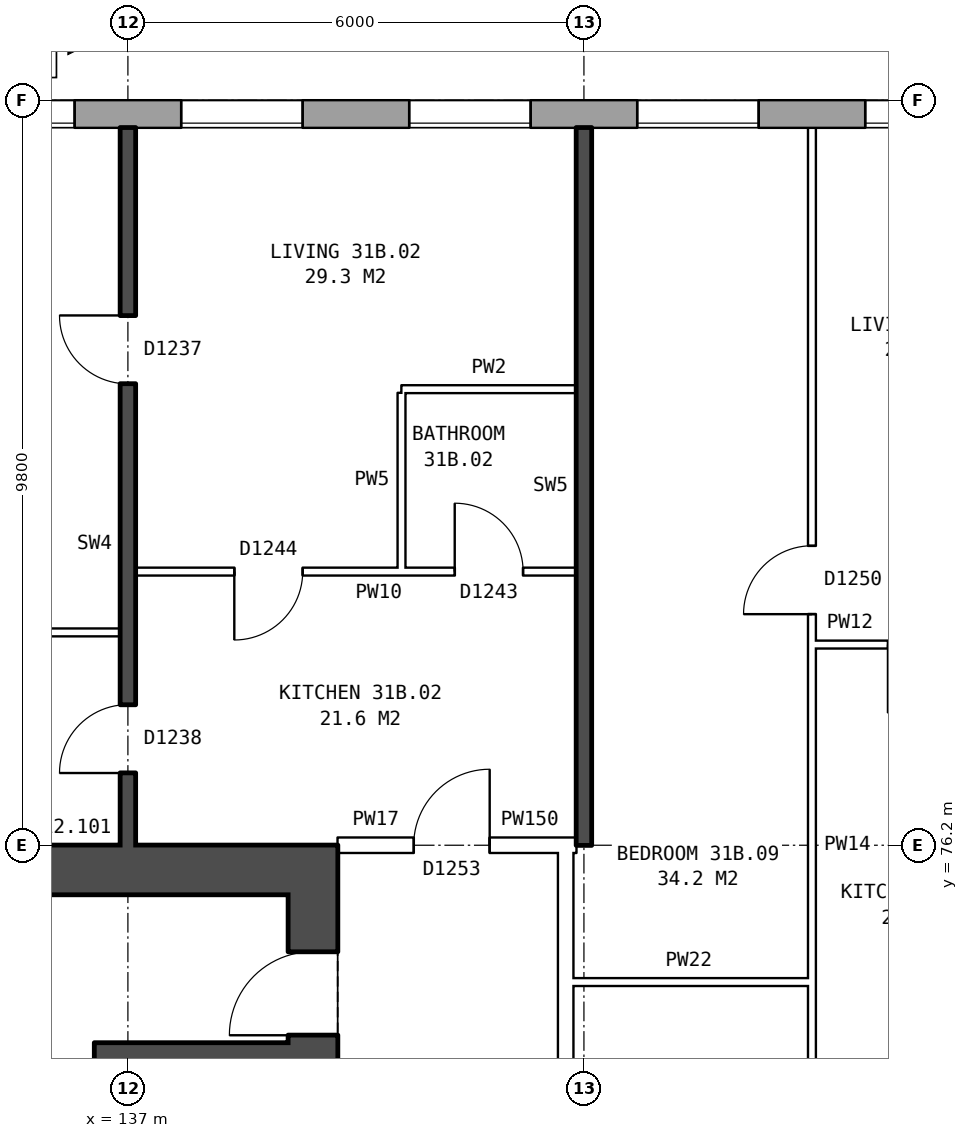
"""IFC4 building model, lengths in metres.
Left out: names, types, materials, properties, quantities, classifications, styles, units other than length and angle.
Written with IfcOpenShell. Run it as: python <this file> out.ifc"""

import sys

from ifc_helpers import new_model, si_unit, direction, frame, frame_2d, origin, place, context, subcontext, project, spatial, rectangle, extrude, element, fill, save


model = new_model("IFC4")
c1 = context("Model", 3, precision=1e-05, world=origin(), true_north=direction((0.0, 1.0)))
c2 = subcontext(c1, "Body", "Model", "MODEL_VIEW")
j1 = project(units=[si_unit("LENGTHUNIT", "METRE"), si_unit("PLANEANGLEUNIT", "RADIAN")], contexts=[c1])
p1 = place(None, origin())
s1 = spatial("IfcSite", under=j1, at=p1, CompositionType="ELEMENT")
p2 = place(p1, origin())
s2 = spatial("IfcBuilding", under=s1, at=p2, CompositionType="ELEMENT")
p3 = place(p2, frame((0.0, 0.0, 111.9)))
s3 = spatial("IfcBuildingStorey", under=s2, at=p3, CompositionType="ELEMENT", Elevation=111.9)
p4 = place(p3, frame((170.925, 85.82, 0.0), z_axis=(0.0, 0.0, 1.0), x_axis=(-1.0, 0.0, 0.0)))
e1 = element("IfcWall", 1, at=p4, inside=s3, PredefinedType="STANDARD", context=c2, shape_type="SweptSolid", body=[
    extrude(rectangle(XDim=36.851, YDim=0.36, at=frame_2d((18.425, 0.0))), origin(), (0.0, 0.0, 1.0), 2.85),
])
p5 = place(p4, frame((1.625, 0.0, 0.8)))
e2 = element("IfcOpeningElement", 2, at=p5, cuts=e1, PredefinedType="OPENING", context=c2, shape_type="SweptSolid", body=[
    extrude(rectangle(XDim=1.6, YDim=1.8, at=frame_2d((0.8, 0.9))), frame((0.0, 0.19, 0.0), z_axis=(0.0, -1.0, 0.0), x_axis=(1.0, 0.0, 0.0)), (0.0, 0.0, 1.0), 0.38),
])
p6 = place(p4, frame((4.625, 0.0, 0.8)))
e3 = element("IfcOpeningElement", 3, at=p6, cuts=e1, PredefinedType="OPENING", context=c2, shape_type="SweptSolid", body=[
    extrude(rectangle(XDim=1.6, YDim=1.8, at=frame_2d((0.8, 0.9))), frame((0.0, 0.19, 0.0), z_axis=(0.0, -1.0, 0.0), x_axis=(1.0, 0.0, 0.0)), (0.0, 0.0, 1.0), 0.38),
])
p7 = place(p4, frame((7.625, 0.0, 0.8)))
e4 = element("IfcOpeningElement", 4, at=p7, cuts=e1, PredefinedType="OPENING", context=c2, shape_type="SweptSolid", body=[
    extrude(rectangle(XDim=1.6, YDim=1.8, at=frame_2d((0.8, 0.9))), frame((0.0, 0.19, 0.0), z_axis=(0.0, -1.0, 0.0), x_axis=(1.0, 0.0, 0.0)), (0.0, 0.0, 1.0), 0.38),
])
p8 = place(p4, frame((10.625, 0.0, 0.8)))
e5 = element("IfcOpeningElement", 5, at=p8, cuts=e1, PredefinedType="OPENING", context=c2, shape_type="SweptSolid", body=[
    extrude(rectangle(XDim=1.6, YDim=1.8, at=frame_2d((0.8, 0.9))), frame((0.0, 0.19, 0.0), z_axis=(0.0, -1.0, 0.0), x_axis=(1.0, 0.0, 0.0)), (0.0, 0.0, 1.0), 0.38),
])
p9 = place(p4, frame((13.625, 0.0, 0.8)))
e6 = element("IfcOpeningElement", 6, at=p9, cuts=e1, PredefinedType="OPENING", context=c2, shape_type="SweptSolid", body=[
    extrude(rectangle(XDim=1.6, YDim=1.8, at=frame_2d((0.8, 0.9))), frame((0.0, 0.19, 0.0), z_axis=(0.0, -1.0, 0.0), x_axis=(1.0, 0.0, 0.0)), (0.0, 0.0, 1.0), 0.38),
])
p10 = place(p4, frame((17.075, 0.0, 0.15)))
e7 = element("IfcOpeningElement", 7, at=p10, cuts=e1, PredefinedType="OPENING", context=c2, shape_type="SweptSolid", body=[
    extrude(rectangle(XDim=0.6, YDim=0.9, at=frame_2d((0.3, 0.45))), frame((0.0, 0.19, 0.0), z_axis=(0.0, -1.0, 0.0), x_axis=(1.0, 0.0, 0.0)), (0.0, 0.0, 1.0), 0.38),
])
p11 = place(p4, frame((19.075, 0.0, 0.25)))
e8 = element("IfcOpeningElement", 8, at=p11, cuts=e1, PredefinedType="OPENING", context=c2, shape_type="SweptSolid", body=[
    extrude(rectangle(XDim=0.6, YDim=0.9, at=frame_2d((0.3, 0.45))), frame((0.0, 0.19, 0.0), z_axis=(0.0, -1.0, 0.0), x_axis=(1.0, 0.0, 0.0)), (0.0, 0.0, 1.0), 0.38),
])
p12 = place(p4, frame((22.625, 0.0, 0.8)))
e9 = element("IfcOpeningElement", 9, at=p12, cuts=e1, PredefinedType="OPENING", context=c2, shape_type="SweptSolid", body=[
    extrude(rectangle(XDim=1.6, YDim=1.8, at=frame_2d((0.8, 0.9))), frame((0.0, 0.19, 0.0), z_axis=(0.0, -1.0, 0.0), x_axis=(1.0, 0.0, 0.0)), (0.0, 0.0, 1.0), 0.38),
])
p13 = place(p4, frame((25.625, 0.0, 0.8)))
e10 = element("IfcOpeningElement", 10, at=p13, cuts=e1, PredefinedType="OPENING", context=c2, shape_type="SweptSolid", body=[
    extrude(rectangle(XDim=1.6, YDim=1.8, at=frame_2d((0.8, 0.9))), frame((0.0, 0.19, 0.0), z_axis=(0.0, -1.0, 0.0), x_axis=(1.0, 0.0, 0.0)), (0.0, 0.0, 1.0), 0.38),
])
p14 = place(p4, frame((28.625, 0.0, 0.8)))
e11 = element("IfcOpeningElement", 11, at=p14, cuts=e1, PredefinedType="OPENING", context=c2, shape_type="SweptSolid", body=[
    extrude(rectangle(XDim=1.6, YDim=1.8, at=frame_2d((0.8, 0.9))), frame((0.0, 0.19, 0.0), z_axis=(0.0, -1.0, 0.0), x_axis=(1.0, 0.0, 0.0)), (0.0, 0.0, 1.0), 0.38),
])
p15 = place(p4, frame((31.625, 0.0, 0.8)))
e12 = element("IfcOpeningElement", 12, at=p15, cuts=e1, PredefinedType="OPENING", context=c2, shape_type="SweptSolid", body=[
    extrude(rectangle(XDim=1.6, YDim=1.8, at=frame_2d((0.8, 0.9))), frame((0.0, 0.19, 0.0), z_axis=(0.0, -1.0, 0.0), x_axis=(1.0, 0.0, 0.0)), (0.0, 0.0, 1.0), 0.38),
])
p16 = place(p4, frame((34.625, 0.0, 0.8)))
e13 = element("IfcOpeningElement", 13, at=p16, cuts=e1, PredefinedType="OPENING", context=c2, shape_type="SweptSolid", body=[
    extrude(rectangle(XDim=1.6, YDim=1.8, at=frame_2d((0.8, 0.9))), frame((0.0, 0.19, 0.0), z_axis=(0.0, -1.0, 0.0), x_axis=(1.0, 0.0, 0.0)), (0.0, 0.0, 1.0), 0.38),
])
p17 = place(p4, frame((17.975, 0.0, 0.25)))
e14 = element("IfcOpeningElement", 14, at=p17, cuts=e1, PredefinedType="OPENING", context=c2, shape_type="SweptSolid", body=[
    extrude(rectangle(XDim=0.8, YDim=1.5, at=frame_2d((0.4, 0.75))), frame((0.0, 0.19, 0.0), z_axis=(0.0, -1.0, 0.0), x_axis=(1.0, 0.0, 0.0)), (0.0, 0.0, 1.0), 0.38),
])
p18 = place(p4, frame((20.525, 0.0, 1.35)))
e15 = element("IfcOpeningElement", 15, at=p18, cuts=e1, PredefinedType="OPENING", context=c2, shape_type="SweptSolid", body=[
    extrude(rectangle(XDim=1.2, YDim=1.2, at=frame_2d((0.6, 0.6))), frame((0.0, 0.19, 0.0), z_axis=(0.0, -1.0, 0.0), x_axis=(1.0, 0.0, 0.0)), (0.0, 0.0, 1.0), 0.38),
])
p19 = place(p3, frame((139.435, 64.45, 0.0), z_axis=(0.0, 0.0, 1.0), x_axis=(0.0, 1.0, 0.0)))
e16 = element("IfcWall", 16, at=p19, inside=s3, PredefinedType="SHEAR", context=c2, shape_type="SweptSolid", body=[
    extrude(rectangle(XDim=11.1, YDim=0.65, at=frame_2d((5.55, 0.0))), origin(), (0.0, 0.0, 1.0), 2.85),
])
p20 = place(p19, frame((0.675, 0.0, 0.0)))
e17 = element("IfcOpeningElement", 17, at=p20, cuts=e16, PredefinedType="OPENING", context=c2, shape_type="SweptSolid", body=[
    extrude(rectangle(XDim=1.1, YDim=2.1, at=frame_2d((0.55, 1.05))), frame((0.0, 0.335, 0.0), z_axis=(0.0, -1.0, 0.0), x_axis=(1.0, 0.0, 0.0)), (0.0, 0.0, 1.0), 0.67),
])
p21 = place(p19, frame((9.25, 0.0, 0.0)))
e18 = element("IfcOpeningElement", 18, at=p21, cuts=e16, PredefinedType="OPENING", context=c2, shape_type="SweptSolid", body=[
    extrude(rectangle(XDim=1.1, YDim=2.1, at=frame_2d((0.55, 1.05))), frame((0.0, 0.335, 0.0), z_axis=(0.0, -1.0, 0.0), x_axis=(1.0, 0.0, 0.0)), (0.0, 0.0, 1.0), 0.67),
])
p22 = place(p19, frame((7.475, 0.0, 0.0)))
e19 = element("IfcOpeningElement", 19, at=p22, cuts=e16, PredefinedType="OPENING", context=c2, shape_type="SweptSolid", body=[
    extrude(rectangle(XDim=0.85, YDim=2.1, at=frame_2d((0.425, 1.05))), frame((0.0, 0.335, 0.0), z_axis=(0.0, -1.0, 0.0), x_axis=(1.0, 0.0, 0.0)), (0.0, 0.0, 1.0), 0.67),
])
p23 = place(p3, frame((139.76, 75.875, 0.0), z_axis=(0.0, 0.0, 1.0), x_axis=(-1.0, 0.0, 0.0)))
e20 = element("IfcWall", 20, at=p23, inside=s3, PredefinedType="SHEAR", context=c2, shape_type="SweptSolid", body=[
    extrude(rectangle(XDim=8.4, YDim=0.65, at=frame_2d((4.2, 0.0))), origin(), (0.0, 0.0, 1.0), 2.85),
])
p24 = place(p3, frame((139.11, 73.45, 0.0), z_axis=(0.0, 0.0, 1.0), x_axis=(-1.0, 0.0, 0.0)))
e21 = element("IfcWall", 21, at=p24, inside=s3, PredefinedType="SHEAR", context=c2, shape_type="SweptSolid", body=[
    extrude(rectangle(XDim=2.25, YDim=0.3, at=frame_2d((1.125, 0.0))), origin(), (0.0, 0.0, 1.0), 2.85),
])
p25 = place(p3, frame((136.71, 71.4, 0.0), z_axis=(0.0, 0.0, 1.0), x_axis=(0.0, 1.0, 0.0)))
e22 = element("IfcWall", 22, at=p25, inside=s3, PredefinedType="SHEAR", context=c2, shape_type="SweptSolid", body=[
    extrude(rectangle(XDim=2.2, YDim=0.3, at=frame_2d((1.1, 0.0))), origin(), (0.0, 0.0, 1.0), 2.85),
])
p26 = place(p3, frame((142.76, 63.9, 0.0), z_axis=(0.0, 0.0, 1.0), x_axis=(0.0, 1.0, 0.0)))
e23 = element("IfcWall", 23, at=p26, inside=s3, PredefinedType="PARTITIONING", context=c2, shape_type="SweptSolid", body=[
    extrude(rectangle(XDim=12.2, YDim=0.2, at=frame_2d((6.1, 0.0))), origin(), (0.0, 0.0, 1.0), 2.85),
])
p27 = place(p26, frame((5.1, 0.0, 0.0)))
e24 = element("IfcOpeningElement", 24, at=p27, cuts=e23, PredefinedType="OPENING", context=c2, shape_type="SweptSolid", body=[
    extrude(rectangle(XDim=2.0, YDim=2.1, at=frame_2d((1.0, 1.05))), frame((0.0, 0.11, 0.0), z_axis=(0.0, -1.0, 0.0), x_axis=(1.0, 0.0, 0.0)), (0.0, 0.0, 1.0), 0.22),
])
p28 = place(p3, frame((142.76, 74.4, 0.0), z_axis=(0.0, 0.0, 1.0), x_axis=(1.0, 0.0, 0.0)))
e25 = element("IfcWall", 25, at=p28, inside=s3, PredefinedType="PARTITIONING", context=c2, shape_type="SweptSolid", body=[
    extrude(rectangle(XDim=3.24, YDim=0.1, at=frame_2d((1.62, 0.0))), origin(), (0.0, 0.0, 1.0), 2.85),
])
p29 = place(p3, frame((139.76, 76.2, 0.0), z_axis=(0.0, 0.0, 1.0), x_axis=(1.0, 0.0, 0.0)))
e26 = element("IfcWall", 26, at=p29, inside=s3, PredefinedType="PARTITIONING", context=c2, shape_type="SweptSolid", body=[
    extrude(rectangle(XDim=3.0, YDim=0.2, at=frame_2d((1.5, 0.0))), origin(), (0.0, 0.0, 1.0), 2.85),
])
p30 = place(p29, frame((1.0, 0.0, 0.0)))
e27 = element("IfcOpeningElement", 27, at=p30, cuts=e26, PredefinedType="OPENING", context=c2, shape_type="SweptSolid", body=[
    extrude(rectangle(XDim=1.0, YDim=2.1, at=frame_2d((0.5, 1.05))), frame((0.0, 0.11, 0.0), z_axis=(0.0, -1.0, 0.0), x_axis=(1.0, 0.0, 0.0)), (0.0, 0.0, 1.0), 0.22),
])
p31 = place(p3, frame((142.76, 76.2, 0.0), z_axis=(0.0, 0.0, 1.0), x_axis=(1.0, 0.0, 0.0)))
e28 = element("IfcWall", 28, at=p31, inside=s3, PredefinedType="PARTITIONING", context=c2, shape_type="SweptSolid", body=[
    extrude(rectangle(XDim=0.14, YDim=0.2, at=frame_2d((0.07, 0.0))), origin(), (0.0, 0.0, 1.0), 2.85),
])
p32 = place(p3, frame((146.0, 78.84, 0.0), z_axis=(0.0, 0.0, 1.0), x_axis=(1.0, 0.0, 0.0)))
e29 = element("IfcWall", 29, at=p32, inside=s3, PredefinedType="PARTITIONING", context=c2, shape_type="SweptSolid", body=[
    extrude(rectangle(XDim=2.9, YDim=0.1, at=frame_2d((1.45, 0.0))), origin(), (0.0, 0.0, 1.0), 2.85),
])
p33 = place(p32, frame((1.0, 0.0, 0.0)))
e30 = element("IfcOpeningElement", 30, at=p33, cuts=e29, PredefinedType="OPENING", context=c2, shape_type="SweptSolid", body=[
    extrude(rectangle(XDim=0.9, YDim=2.1, at=frame_2d((0.45, 1.05))), frame((0.0, 0.06, 0.0), z_axis=(0.0, -1.0, 0.0), x_axis=(1.0, 0.0, 0.0)), (0.0, 0.0, 1.0), 0.12),
])
p34 = place(p3, frame((131.36, 79.0, 0.0), z_axis=(0.0, 0.0, 1.0), x_axis=(1.0, 0.0, 0.0)))
e31 = element("IfcWall", 31, at=p34, inside=s3, PredefinedType="PARTITIONING", context=c2, shape_type="SweptSolid", body=[
    extrude(rectangle(XDim=5.54, YDim=0.1, at=frame_2d((2.77, 0.0))), origin(), (0.0, 0.0, 1.0), 2.85),
])
p35 = place(p3, frame((137.1, 79.8, 0.0), z_axis=(0.0, 0.0, 1.0), x_axis=(1.0, 0.0, 0.0)))
e32 = element("IfcWall", 32, at=p35, inside=s3, PredefinedType="PARTITIONING", context=c2, shape_type="SweptSolid", body=[
    extrude(rectangle(XDim=5.8, YDim=0.1, at=frame_2d((2.9, 0.0))), origin(), (0.0, 0.0, 1.0), 2.85),
])
p36 = place(p35, frame((1.3, 0.0, 0.0)))
e33 = element("IfcOpeningElement", 33, at=p36, cuts=e32, PredefinedType="OPENING", context=c2, shape_type="SweptSolid", body=[
    extrude(rectangle(XDim=0.9, YDim=2.1, at=frame_2d((0.45, 1.05))), frame((0.0, 0.06, 0.0), z_axis=(0.0, -1.0, 0.0), x_axis=(1.0, 0.0, 0.0)), (0.0, 0.0, 1.0), 0.12),
])
p37 = place(p35, frame((4.2, 0.0, 0.0)))
e34 = element("IfcOpeningElement", 34, at=p37, cuts=e32, PredefinedType="OPENING", context=c2, shape_type="SweptSolid", body=[
    extrude(rectangle(XDim=0.9, YDim=2.1, at=frame_2d((0.45, 1.05))), frame((0.0, 0.06, 0.0), z_axis=(0.0, -1.0, 0.0), x_axis=(1.0, 0.0, 0.0)), (0.0, 0.0, 1.0), 0.12),
])
p38 = place(p3, frame((140.6, 82.2, 0.0), z_axis=(0.0, 0.0, 1.0), x_axis=(1.0, 0.0, 0.0)))
e35 = element("IfcWall", 35, at=p38, inside=s3, PredefinedType="PARTITIONING", context=c2, shape_type="SweptSolid", body=[
    extrude(rectangle(XDim=2.3, YDim=0.1, at=frame_2d((1.15, 0.0))), origin(), (0.0, 0.0, 1.0), 2.85),
])
p39 = place(p3, frame((137.0, 76.2, 0.0), z_axis=(0.0, 0.0, 1.0), x_axis=(0.0, 1.0, 0.0)))
e36 = element("IfcWall", 36, at=p39, inside=s3, PredefinedType="SOLIDWALL", context=c2, shape_type="SweptSolid", body=[
    extrude(rectangle(XDim=9.44, YDim=0.2, at=frame_2d((4.72, 0.0))), origin(), (0.0, 0.0, 1.0), 2.85),
])
p40 = place(p39, frame((6.07, 0.0, 0.0)))
e37 = element("IfcOpeningElement", 37, at=p40, cuts=e36, PredefinedType="OPENING", context=c2, shape_type="SweptSolid", body=[
    extrude(rectangle(XDim=0.9, YDim=2.1, at=frame_2d((0.45, 1.05))), frame((0.0, 0.11, 0.0), z_axis=(0.0, -1.0, 0.0), x_axis=(1.0, 0.0, 0.0)), (0.0, 0.0, 1.0), 0.22),
])
p41 = place(p39, frame((0.95, 0.0, 0.0)))
e38 = element("IfcOpeningElement", 38, at=p41, cuts=e36, PredefinedType="OPENING", context=c2, shape_type="SweptSolid", body=[
    extrude(rectangle(XDim=0.9, YDim=2.1, at=frame_2d((0.45, 1.05))), frame((0.0, 0.11, 0.0), z_axis=(0.0, -1.0, 0.0), x_axis=(1.0, 0.0, 0.0)), (0.0, 0.0, 1.0), 0.22),
])
p42 = place(p3, frame((140.6, 79.85, 0.0), z_axis=(0.0, 0.0, 1.0), x_axis=(0.0, 1.0, 0.0)))
e39 = element("IfcWall", 39, at=p42, inside=s3, PredefinedType="PARTITIONING", context=c2, shape_type="SweptSolid", body=[
    extrude(rectangle(XDim=2.3, YDim=0.1, at=frame_2d((1.15, 0.0))), origin(), (0.0, 0.0, 1.0), 2.85),
])
p43 = place(p3, frame((143.0, 76.2, 0.0), z_axis=(0.0, 0.0, 1.0), x_axis=(0.0, 1.0, 0.0)))
e40 = element("IfcWall", 40, at=p43, inside=s3, PredefinedType="SOLIDWALL", context=c2, shape_type="SweptSolid", body=[
    extrude(rectangle(XDim=9.44, YDim=0.2, at=frame_2d((4.72, 0.0))), origin(), (0.0, 0.0, 1.0), 2.85),
])
p44 = place(p3, frame((146.0, 71.3, 0.0), z_axis=(0.0, 0.0, 1.0), x_axis=(0.0, 1.0, 0.0)))
e41 = element("IfcWall", 41, at=p44, inside=s3, PredefinedType="PARTITIONING", context=c2, shape_type="SweptSolid", body=[
    extrude(rectangle(XDim=14.34, YDim=0.1, at=frame_2d((7.17, 0.0))), origin(), (0.0, 0.0, 1.0), 2.85),
])
p45 = place(p44, frame((7.94, 0.0, 0.0)))
e42 = element("IfcOpeningElement", 42, at=p45, cuts=e41, PredefinedType="OPENING", context=c2, shape_type="SweptSolid", body=[
    extrude(rectangle(XDim=0.9, YDim=2.1, at=frame_2d((0.45, 1.05))), frame((0.0, 0.06, 0.0), z_axis=(0.0, -1.0, 0.0), x_axis=(1.0, 0.0, 0.0)), (0.0, 0.0, 1.0), 0.12),
])
p46 = place(p44, frame((0.4, 0.0, 0.0)))
e43 = element("IfcOpeningElement", 43, at=p46, cuts=e41, PredefinedType="OPENING", context=c2, shape_type="SweptSolid", body=[
    extrude(rectangle(XDim=0.9, YDim=2.1, at=frame_2d((0.45, 1.05))), frame((0.0, 0.06, 0.0), z_axis=(0.0, -1.0, 0.0), x_axis=(1.0, 0.0, 0.0)), (0.0, 0.0, 1.0), 0.12),
])
p47 = place(p12, origin())
e44 = element("IfcWindow", 44, at=p47, inside=s3, PartitioningType="SINGLE_PANEL", PredefinedType="WINDOW", context=c2, shape_type="SweptSolid", body=[
    extrude(rectangle(XDim=1.6, YDim=1.8, at=frame_2d((0.8, 0.9))), frame((0.0, 0.15, 0.0), z_axis=(0.0, -1.0, 0.0), x_axis=(1.0, 0.0, 0.0)), (0.0, 0.0, 1.0), 0.06),
])
fill(e9, e44)
p48 = place(p13, origin())
e45 = element("IfcWindow", 45, at=p48, inside=s3, PartitioningType="SINGLE_PANEL", PredefinedType="WINDOW", context=c2, shape_type="SweptSolid", body=[
    extrude(rectangle(XDim=1.6, YDim=1.8, at=frame_2d((0.8, 0.9))), frame((0.0, 0.15, 0.0), z_axis=(0.0, -1.0, 0.0), x_axis=(1.0, 0.0, 0.0)), (0.0, 0.0, 1.0), 0.06),
])
fill(e10, e45)
p49 = place(p14, origin())
e46 = element("IfcWindow", 46, at=p49, inside=s3, PartitioningType="SINGLE_PANEL", PredefinedType="WINDOW", context=c2, shape_type="SweptSolid", body=[
    extrude(rectangle(XDim=1.6, YDim=1.8, at=frame_2d((0.8, 0.9))), frame((0.0, 0.15, 0.0), z_axis=(0.0, -1.0, 0.0), x_axis=(1.0, 0.0, 0.0)), (0.0, 0.0, 1.0), 0.06),
])
fill(e11, e46)
p50 = place(p15, origin())
e47 = element("IfcWindow", 47, at=p50, inside=s3, PartitioningType="SINGLE_PANEL", PredefinedType="WINDOW", context=c2, shape_type="SweptSolid", body=[
    extrude(rectangle(XDim=1.6, YDim=1.8, at=frame_2d((0.8, 0.9))), frame((0.0, 0.15, 0.0), z_axis=(0.0, -1.0, 0.0), x_axis=(1.0, 0.0, 0.0)), (0.0, 0.0, 1.0), 0.06),
])
fill(e12, e47)
p51 = place(p16, origin())
e48 = element("IfcWindow", 48, at=p51, inside=s3, PartitioningType="SINGLE_PANEL", PredefinedType="WINDOW", context=c2, shape_type="SweptSolid", body=[
    extrude(rectangle(XDim=1.6, YDim=1.8, at=frame_2d((0.8, 0.9))), frame((0.0, 0.15, 0.0), z_axis=(0.0, -1.0, 0.0), x_axis=(1.0, 0.0, 0.0)), (0.0, 0.0, 1.0), 0.06),
])
fill(e13, e48)
p52 = place(p21, origin())
e49 = element("IfcDoor", 49, at=p52, inside=s3, OperationType="SINGLE_SWING_LEFT", PredefinedType="DOOR", context=c2, shape_type="SweptSolid", body=[
    extrude(rectangle(XDim=1.1, YDim=2.1, at=frame_2d((0.55, 1.05))), frame((0.0, 0.31, 0.0), z_axis=(0.0, -1.0, 0.0), x_axis=(1.0, 0.0, 0.0)), (0.0, 0.0, 1.0), 0.05),
])
fill(e18, e49)
p53 = place(p40, origin())
e50 = element("IfcDoor", 50, at=p53, inside=s3, OperationType="SINGLE_SWING_RIGHT", PredefinedType="DOOR", context=c2, shape_type="SweptSolid", body=[
    extrude(rectangle(XDim=0.9, YDim=2.1, at=frame_2d((0.45, 1.05))), frame((0.0, 0.025, 0.0), z_axis=(0.0, -1.0, 0.0), x_axis=(1.0, 0.0, 0.0)), (0.0, 0.0, 1.0), 0.05),
])
fill(e37, e50)
p54 = place(p41, origin())
e51 = element("IfcDoor", 51, at=p54, inside=s3, OperationType="SINGLE_SWING_LEFT", PredefinedType="DOOR", context=c2, shape_type="SweptSolid", body=[
    extrude(rectangle(XDim=0.9, YDim=2.1, at=frame_2d((0.45, 1.05))), frame((0.0, 0.025, 0.0), z_axis=(0.0, -1.0, 0.0), x_axis=(1.0, 0.0, 0.0)), (0.0, 0.0, 1.0), 0.05),
])
fill(e38, e51)
p55 = place(p30, origin())
e52 = element("IfcDoor", 52, at=p55, inside=s3, OperationType="SINGLE_SWING_RIGHT", PredefinedType="DOOR", context=c2, shape_type="SweptSolid", body=[
    extrude(rectangle(XDim=1.0, YDim=2.1, at=frame_2d((0.5, 1.05))), frame((0.0, 0.025, 0.0), z_axis=(0.0, -1.0, 0.0), x_axis=(1.0, 0.0, 0.0)), (0.0, 0.0, 1.0), 0.05),
])
fill(e27, e52)
p56 = place(p36, frame((0.9, 0.0, 0.0), z_axis=(0.0, 0.0, 1.0), x_axis=(-1.0, 0.0, 0.0)))
e53 = element("IfcDoor", 53, at=p56, inside=s3, OperationType="SINGLE_SWING_RIGHT", PredefinedType="DOOR", context=c2, shape_type="SweptSolid", body=[
    extrude(rectangle(XDim=0.9, YDim=2.1, at=frame_2d((0.45, 1.05))), frame((0.0, 0.025, 0.0), z_axis=(0.0, -1.0, 0.0), x_axis=(1.0, 0.0, 0.0)), (0.0, 0.0, 1.0), 0.05),
])
fill(e33, e53)
p57 = place(p37, origin())
e54 = element("IfcDoor", 54, at=p57, inside=s3, OperationType="SINGLE_SWING_LEFT", PredefinedType="DOOR", context=c2, shape_type="SweptSolid", body=[
    extrude(rectangle(XDim=0.9, YDim=2.1, at=frame_2d((0.45, 1.05))), frame((0.0, 0.025, 0.0), z_axis=(0.0, -1.0, 0.0), x_axis=(1.0, 0.0, 0.0)), (0.0, 0.0, 1.0), 0.05),
])
fill(e34, e54)
p58 = place(p45, origin())
e55 = element("IfcDoor", 55, at=p58, inside=s3, OperationType="SINGLE_SWING_LEFT", PredefinedType="DOOR", context=c2, shape_type="SweptSolid", body=[
    extrude(rectangle(XDim=0.9, YDim=2.1, at=frame_2d((0.45, 1.05))), frame((0.0, 0.025, 0.0), z_axis=(0.0, -1.0, 0.0), x_axis=(1.0, 0.0, 0.0)), (0.0, 0.0, 1.0), 0.05),
])
fill(e42, e55)
save(model, sys.argv[1])
